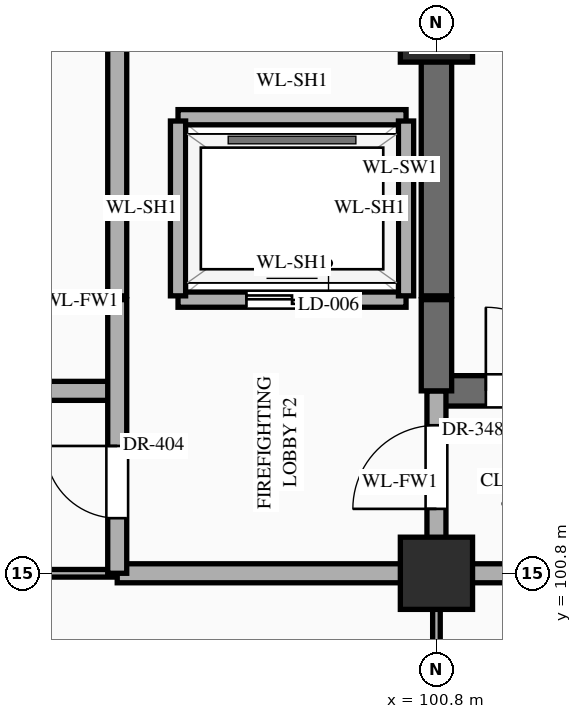
"""IFC4 building model, lengths in metres.
Left out: names, types, materials, properties, quantities, classifications, styles, units other than length and angle.
Written with IfcOpenShell. Run it as: python <this file> out.ifc"""

import sys

from ifc_helpers import new_model, si_unit, direction, frame, frame_2d, origin, origin_2d, place, context, subcontext, project, spatial, rectangle, extrude, element, fill, save


model = new_model("IFC4")
c1 = context("Model", 3, precision=1e-05, world=origin(), true_north=direction((0.0, 1.0)))
c2 = subcontext(c1, "Body", "Model", "MODEL_VIEW")
j1 = project(units=[si_unit("LENGTHUNIT", "METRE"), si_unit("PLANEANGLEUNIT", "RADIAN")], contexts=[c1])
p1 = place(None, origin())
s1 = spatial("IfcSite", under=j1, at=p1, CompositionType="ELEMENT")
p2 = place(p1, origin())
s2 = spatial("IfcBuilding", under=s1, at=p2, CompositionType="ELEMENT")
p3 = place(p2, frame((0.0, 0.0, -5.4)))
s3 = spatial("IfcBuildingStorey", under=s2, at=p3, CompositionType="ELEMENT", Elevation=-5.4)
for number, where, z_axis, x_axis in (
    (1, (100.8, 100.8, 0.0), (0.0, 0.0, 1.0), (1.0, 0.0, 0.0)),
    (2, (100.8, 108.0, 0.0), (0.0, 0.0, 1.0), (1.0, 0.0, 0.0)),
):
    element("IfcColumn", number, at=place(p3, frame(where, z_axis=z_axis, x_axis=x_axis)), inside=s3, PredefinedType="COLUMN", context=c2, shape_type="SweptSolid", body=[
        extrude(rectangle(XDim=0.95, YDim=0.95, at=origin_2d()), origin(), (0.0, 0.0, 1.0), 5.4),
    ])
p4 = place(p3, frame((92.4, 100.8, 0.0), z_axis=(0.0, 0.0, 1.0), x_axis=(1.0, 0.0, 0.0)))
e3 = element("IfcWall", 3, at=p4, inside=s3, PredefinedType="STANDARD", context=c2, shape_type="SweptSolid", body=[
    extrude(rectangle(XDim=4.2, YDim=0.1, at=frame_2d((2.1, 0.0))), origin(), (0.0, 0.0, 1.0), 4.25),
])
p5 = place(p4, frame((1.768, 0.0, 0.0)))
e4 = element("IfcOpeningElement", 4, at=p5, cuts=e3, PredefinedType="OPENING", context=c2, shape_type="SweptSolid", body=[
    extrude(rectangle(XDim=1.06, YDim=2.4, at=frame_2d((0.53, 1.2))), frame((0.0, 0.062, 0.0), z_axis=(0.0, -1.0, 0.0), x_axis=(1.0, 0.0, 0.0)), (0.0, 0.0, 1.0), 0.124),
])
p6 = place(p3, frame((96.6, 100.8, 0.0), z_axis=(0.0, 0.0, 1.0), x_axis=(1.0, 0.0, 0.0)))
e5 = element("IfcWall", 5, at=p6, inside=s3, PredefinedType="STANDARD", context=c2, shape_type="SweptSolid", body=[
    extrude(rectangle(XDim=12.6, YDim=0.25, at=frame_2d((6.3, 0.0))), origin(), (0.0, 0.0, 1.0), 4.25),
])
p7 = place(p6, frame((7.925, 0.0, 0.0)))
e6 = element("IfcOpeningElement", 6, at=p7, cuts=e5, PredefinedType="OPENING", context=c2, shape_type="SweptSolid", body=[
    extrude(rectangle(XDim=0.95, YDim=2.15, at=frame_2d((0.475, 1.075))), frame((0.0, 0.137, 0.0), z_axis=(0.0, -1.0, 0.0), x_axis=(1.0, 0.0, 0.0)), (0.0, 0.0, 1.0), 0.274),
])
p8 = place(p3, frame((92.4, 103.2, 0.0), z_axis=(0.0, 0.0, 1.0), x_axis=(1.0, 0.0, 0.0)))
e7 = element("IfcWall", 7, at=p8, inside=s3, PredefinedType="STANDARD", context=c2, shape_type="SweptSolid", body=[
    extrude(rectangle(XDim=4.2, YDim=0.25, at=frame_2d((2.1, 0.0))), origin(), (0.0, 0.0, 1.0), 5.1),
])
p9 = place(p8, frame((1.6, 0.0, 0.0)))
e8 = element("IfcOpeningElement", 8, at=p9, cuts=e7, PredefinedType="OPENING", context=c2, shape_type="SweptSolid", body=[
    extrude(rectangle(XDim=1.0, YDim=2.2, at=frame_2d((0.5, 1.1))), frame((0.0, 0.137, 0.0), z_axis=(0.0, -1.0, 0.0), x_axis=(1.0, 0.0, 0.0)), (0.0, 0.0, 1.0), 0.274),
])
p10 = place(p3, frame((100.8, 103.2, 0.0), z_axis=(0.0, 0.0, 1.0), x_axis=(1.0, 0.0, 0.0)))
e9 = element("IfcWall", 9, at=p10, inside=s3, PredefinedType="SHEAR", context=c2, shape_type="SweptSolid", body=[
    extrude(rectangle(XDim=8.4, YDim=0.4, at=frame_2d((4.2, 0.0))), origin(), (0.0, 0.0, 1.0), 5.1),
])
p11 = place(p10, frame((0.65, 0.0, 0.0)))
e10 = element("IfcOpeningElement", 10, at=p11, cuts=e9, PredefinedType="OPENING", context=c2, shape_type="SweptSolid", body=[
    extrude(rectangle(XDim=1.1, YDim=2.2, at=frame_2d((0.55, 1.1))), frame((0.0, 0.212, 0.0), z_axis=(0.0, -1.0, 0.0), x_axis=(1.0, 0.0, 0.0)), (0.0, 0.0, 1.0), 0.424),
])
p12 = place(p3, frame((97.4, 104.4, 0.0), z_axis=(0.0, 0.0, 1.0), x_axis=(1.0, 0.0, 0.0)))
e11 = element("IfcWall", 11, at=p12, inside=s3, PredefinedType="STANDARD", context=c2, shape_type="SweptSolid", body=[
    extrude(rectangle(XDim=3.0, YDim=0.2, at=frame_2d((1.5, 0.0))), origin(), (0.0, 0.0, 1.0), 5.1),
])
p13 = place(p12, frame((0.9, 0.0, 0.0)))
e12 = element("IfcOpeningElement", 12, at=p13, cuts=e11, PredefinedType="OPENING", context=c2, shape_type="SweptSolid", body=[
    extrude(rectangle(XDim=1.2, YDim=2.15, at=frame_2d((0.6, 1.075))), frame((0.0, 0.112, 0.0), z_axis=(0.0, -1.0, 0.0), x_axis=(1.0, 0.0, 0.0)), (0.0, 0.0, 1.0), 0.224),
])
p14 = place(p3, frame((97.4, 106.8, 0.0), z_axis=(0.0, 0.0, 1.0), x_axis=(1.0, 0.0, 0.0)))
e13 = element("IfcWall", 13, at=p14, inside=s3, PredefinedType="STANDARD", context=c2, shape_type="SweptSolid", body=[
    extrude(rectangle(XDim=3.0, YDim=0.2, at=frame_2d((1.5, 0.0))), origin(), (0.0, 0.0, 1.0), 5.1),
])
p15 = place(p3, frame((96.6, 100.8, 0.0), z_axis=(0.0, 0.0, 1.0), x_axis=(0.0, 1.0, 0.0)))
e14 = element("IfcWall", 14, at=p15, inside=s3, PredefinedType="STANDARD", context=c2, shape_type="SweptSolid", body=[
    extrude(rectangle(XDim=3.6, YDim=0.25, at=frame_2d((1.8, 0.0))), origin(), (0.0, 0.0, 1.0), 4.65),
])
p16 = place(p15, frame((0.725, 0.0, 0.0)))
e15 = element("IfcOpeningElement", 15, at=p16, cuts=e14, PredefinedType="OPENING", context=c2, shape_type="SweptSolid", body=[
    extrude(rectangle(XDim=0.95, YDim=2.15, at=frame_2d((0.475, 1.075))), frame((0.0, 0.137, 0.0), z_axis=(0.0, -1.0, 0.0), x_axis=(1.0, 0.0, 0.0)), (0.0, 0.0, 1.0), 0.274),
])
p17 = place(p3, frame((96.6, 104.45, 0.0), z_axis=(0.0, 0.0, 1.0), x_axis=(0.0, 1.0, 0.0)))
e16 = element("IfcWall", 16, at=p17, inside=s3, PredefinedType="STANDARD", context=c2, shape_type="SweptSolid", body=[
    extrude(rectangle(XDim=3.5, YDim=0.25, at=frame_2d((1.75, 0.0))), origin(), (0.0, 0.0, 1.0), 4.65),
])
for number, where, z_axis, x_axis in (
    (17, (97.4, 104.45, 0.0), (0.0, 0.0, 1.0), (0.0, 1.0, 0.0)),
    (18, (100.4, 104.45, 0.0), (0.0, 0.0, 1.0), (0.0, 1.0, 0.0)),
):
    element("IfcWall", number, at=place(p3, frame(where, z_axis=z_axis, x_axis=x_axis)), inside=s3, PredefinedType="STANDARD", context=c2, shape_type="SweptSolid", body=[
        extrude(rectangle(XDim=2.3, YDim=0.2, at=frame_2d((1.15, 0.0))), origin(), (0.0, 0.0, 1.0), 5.1),
    ])
p18 = place(p3, frame((100.8, 96.0, 0.0), z_axis=(0.0, 0.0, 1.0), x_axis=(0.0, 1.0, 0.0)))
e19 = element("IfcWall", 19, at=p18, inside=s3, PredefinedType="STANDARD", context=c2, shape_type="SweptSolid", body=[
    extrude(rectangle(XDim=4.8, YDim=0.1, at=frame_2d((2.4, 0.0))), origin(), (0.0, 0.0, 1.0), 4.35),
])
p19 = place(p3, frame((100.8, 100.8, 0.0), z_axis=(0.0, 0.0, 1.0), x_axis=(0.0, 1.0, 0.0)))
e20 = element("IfcWall", 20, at=p19, inside=s3, PredefinedType="STANDARD", context=c2, shape_type="SweptSolid", body=[
    extrude(rectangle(XDim=2.4, YDim=0.25, at=frame_2d((1.2, 0.0))), origin(), (0.0, 0.0, 1.0), 4.35),
])
p20 = place(p19, frame((0.847, 0.0, 0.0)))
e21 = element("IfcOpeningElement", 21, at=p20, cuts=e20, PredefinedType="OPENING", context=c2, shape_type="SweptSolid", body=[
    extrude(rectangle(XDim=1.1, YDim=2.2, at=frame_2d((0.55, 1.1))), frame((0.0, 0.137, 0.0), z_axis=(0.0, -1.0, 0.0), x_axis=(1.0, 0.0, 0.0)), (0.0, 0.0, 1.0), 0.274),
])
p21 = place(p3, frame((100.8, 103.2, 0.0), z_axis=(0.0, 0.0, 1.0), x_axis=(0.0, 1.0, 0.0)))
e22 = element("IfcWall", 22, at=p21, inside=s3, PredefinedType="SHEAR", context=c2, shape_type="SweptSolid", body=[
    extrude(rectangle(XDim=1.2, YDim=0.4, at=frame_2d((0.6, 0.0))), origin(), (0.0, 0.0, 1.0), 5.1),
])
p22 = place(p3, frame((100.8, 104.45, 0.0), z_axis=(0.0, 0.0, 1.0), x_axis=(0.0, 1.0, 0.0)))
e23 = element("IfcWall", 23, at=p22, inside=s3, PredefinedType="SHEAR", context=c2, shape_type="SweptSolid", body=[
    extrude(rectangle(XDim=3.5, YDim=0.4, at=frame_2d((1.75, 0.0))), origin(), (0.0, 0.0, 1.0), 5.1),
])
p23 = place(p13, origin())
e24 = element("IfcDoor", 24, at=p23, inside=s3, OperationType="DOUBLE_DOOR_SLIDING", PredefinedType="DOOR", context=c2, shape_type="SweptSolid", body=[
    extrude(rectangle(XDim=1.2, YDim=2.15, at=frame_2d((0.6, 1.075))), frame((0.0, 0.025, 0.0), z_axis=(0.0, -1.0, 0.0), x_axis=(1.0, 0.0, 0.0)), (0.0, 0.0, 1.0), 0.05),
])
fill(e12, e24)
p24 = place(p11, origin())
e25 = element("IfcDoor", 25, at=p24, inside=s3, OperationType="SINGLE_SWING_LEFT", PredefinedType="DOOR", context=c2, shape_type="SweptSolid", body=[
    extrude(rectangle(XDim=1.1, YDim=2.2, at=frame_2d((0.55, 1.1))), frame((0.0, 0.025, 0.0), z_axis=(0.0, -1.0, 0.0), x_axis=(1.0, 0.0, 0.0)), (0.0, 0.0, 1.0), 0.05),
])
fill(e10, e25)
p25 = place(p20, origin())
e26 = element("IfcDoor", 26, at=p25, inside=s3, OperationType="SINGLE_SWING_LEFT", PredefinedType="DOOR", context=c2, shape_type="SweptSolid", body=[
    extrude(rectangle(XDim=1.1, YDim=2.2, at=frame_2d((0.55, 1.1))), frame((0.0, 0.025, 0.0), z_axis=(0.0, -1.0, 0.0), x_axis=(1.0, 0.0, 0.0)), (0.0, 0.0, 1.0), 0.05),
])
fill(e21, e26)
p26 = place(p16, origin())
e27 = element("IfcDoor", 27, at=p26, inside=s3, OperationType="SINGLE_SWING_RIGHT", PredefinedType="DOOR", context=c2, shape_type="SweptSolid", body=[
    extrude(rectangle(XDim=0.95, YDim=2.15, at=frame_2d((0.475, 1.075))), frame((0.0, 0.025, 0.0), z_axis=(0.0, -1.0, 0.0), x_axis=(1.0, 0.0, 0.0)), (0.0, 0.0, 1.0), 0.05),
])
fill(e15, e27)
save(model, sys.argv[1])
